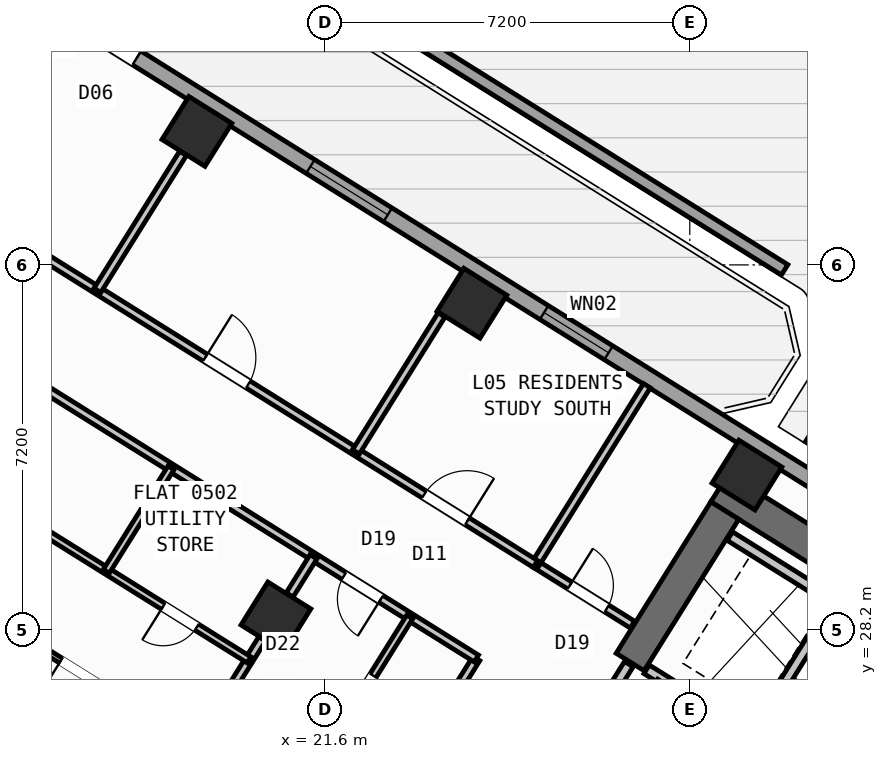
"""IFC4 building model, lengths in metres.
Left out: names, types, materials, properties, quantities, classifications, styles, units other than length and angle.
Written with IfcOpenShell. Run it as: python <this file> out.ifc"""

import sys

from ifc_helpers import new_model, si_unit, direction, frame, frame_2d, origin, origin_2d, place, context, subcontext, project, spatial, rectangle, hollow_rectangle, extrude, source, transform, mapped, element, fill, save


model = new_model("IFC4")
c1 = context("Model", 3, precision=1e-05, world=origin(), true_north=direction((0.0, 1.0)))
c2 = subcontext(c1, "Body", "Model", "MODEL_VIEW")
j1 = project(units=[si_unit("LENGTHUNIT", "METRE"), si_unit("PLANEANGLEUNIT", "RADIAN")], contexts=[c1])
p1 = place(None, origin())
s1 = spatial("IfcSite", under=j1, at=p1, CompositionType="ELEMENT")
p2 = place(p1, origin())
s2 = spatial("IfcBuilding", under=s1, at=p2, CompositionType="ELEMENT")
p3 = place(p2, frame((0.0, 0.0, 24.0)))
s3 = spatial("IfcBuildingStorey", under=s2, at=p3, CompositionType="ELEMENT", Elevation=24.0)
p4 = place(p3, frame((40.615, 23.983, 0.0), z_axis=(0.0, 0.0, 1.0), x_axis=(-0.848045953968, 0.529922692436, 0.0)))
e1 = element("IfcWall", 1, at=p4, inside=s3, PredefinedType="SHEAR", context=c2, shape_type="SweptSolid", body=[
    extrude(rectangle(XDim=13.24, YDim=0.65, at=frame_2d((6.62, 0.0))), origin(), (0.0, 0.0, 1.0), 3.35),
])
p5 = place(p3, frame((29.491, 30.552, 0.0), z_axis=(0.0, 0.0, 1.0), x_axis=(-0.529893103397, -0.8480644427, 0.0)))
e2 = element("IfcWall", 2, at=p5, inside=s3, PredefinedType="SHEAR", context=c2, shape_type="SweptSolid", body=[
    extrude(rectangle(XDim=3.525, YDim=0.65, at=frame_2d((1.763, 0.0))), origin(), (0.0, 0.0, 1.0), 3.35),
])
m1 = source(origin(), c2, "Body", "SweptSolid", [
    extrude(hollow_rectangle(XDim=1.0, YDim=1.0, WallThickness=0.04, at=origin_2d()), origin(), (0.0, 0.0, 1.0), 3.6),
])
for number, where, z_axis, x_axis in (
    (3, (29.928, 31.251, 0.0), (0.0, 0.0, 1.0), (-0.848, 0.53, 0.0)),
    (4, (24.5, 34.643, 0.0), (0.0, 0.0, 1.0), (-0.848, 0.53, 0.0)),
    (5, (20.632, 28.452, 0.0), (0.0, 0.0, 1.0), (-0.848, 0.53, 0.0)),
    (6, (19.073, 38.034, 0.0), (0.0, 0.0, 1.0), (-0.848, 0.53, 0.0)),
):
    element("IfcColumn", number, at=place(p3, frame(where, z_axis=z_axis, x_axis=x_axis)), inside=s3, PredefinedType="COLUMN", context=c2, shape_type="MappedRepresentation", body=[
        mapped(m1, transform((0.0, 0.0, 0.0), scale=1.0)),
    ])
p6 = place(p3, frame((40.961, 25.878, 0.0), z_axis=(0.0, 0.0, 1.0), x_axis=(-0.848053997745, 0.5299098196, 0.0)))
e7 = element("IfcWall", 7, at=p6, inside=s3, PredefinedType="PARAPET", context=c2, shape_type="SweptSolid", body=[
    extrude(rectangle(XDim=11.574, YDim=0.24, at=frame_2d((5.787, 0.0))), origin(), (0.0, 0.0, 1.0), 1.15),
])
p7 = place(p3, frame((30.672, 35.303, 0.0), z_axis=(0.0, 0.0, 1.0), x_axis=(-0.848051685884, 0.529913519425, 0.0)))
e8 = element("IfcWall", 8, at=p7, inside=s3, PredefinedType="PARAPET", context=c2, shape_type="SweptSolid", body=[
    extrude(rectangle(XDim=14.387, YDim=0.24, at=frame_2d((7.194, 0.0))), origin(), (0.0, 0.0, 1.0), 1.15),
])
p8 = place(p3, frame((14.138, 41.825, 0.0), z_axis=(0.0, 0.0, 1.0), x_axis=(0.848046498049, -0.529921821731, 0.0)))
e9 = element("IfcWall", 9, at=p8, inside=s3, PredefinedType="STANDARD", context=c2, shape_type="SweptSolid", body=[
    extrude(rectangle(XDim=31.588, YDim=0.32, at=frame_2d((15.794, 0.0))), origin(), (0.0, 0.0, 1.0), 3.35),
])
p9 = place(p8, frame((3.369, 0.0, 0.0)))
e10 = element("IfcOpeningElement", 10, at=p9, cuts=e9, PredefinedType="OPENING", context=c2, shape_type="SweptSolid", body=[
    extrude(rectangle(XDim=1.05, YDim=2.15, at=frame_2d((0.525, 1.075))), frame((0.0, 0.17, 0.0), z_axis=(0.0, -1.0, 0.0), x_axis=(1.0, 0.0, 0.0)), (0.0, 0.0, 1.0), 0.34),
])
p10 = place(p8, frame((0.946, 0.0, 0.85)))
e11 = element("IfcOpeningElement", 11, at=p10, cuts=e9, PredefinedType="OPENING", context=c2, shape_type="SweptSolid", body=[
    extrude(rectangle(XDim=1.8, YDim=1.5, at=frame_2d((0.9, 0.75))), frame((0.0, 0.17, 0.0), z_axis=(0.0, -1.0, 0.0), x_axis=(1.0, 0.0, 0.0)), (0.0, 0.0, 1.0), 0.34),
])
p11 = place(p8, frame((8.46, 0.0, 0.85)))
e12 = element("IfcOpeningElement", 12, at=p11, cuts=e9, PredefinedType="OPENING", context=c2, shape_type="SweptSolid", body=[
    extrude(rectangle(XDim=1.8, YDim=1.5, at=frame_2d((0.9, 0.75))), frame((0.0, 0.17, 0.0), z_axis=(0.0, -1.0, 0.0), x_axis=(1.0, 0.0, 0.0)), (0.0, 0.0, 1.0), 0.34),
])
p12 = place(p8, frame((13.899, 0.0, 0.85)))
e13 = element("IfcOpeningElement", 13, at=p12, cuts=e9, PredefinedType="OPENING", context=c2, shape_type="SweptSolid", body=[
    extrude(rectangle(XDim=1.5, YDim=1.5, at=frame_2d((0.75, 0.75))), frame((0.0, 0.17, 0.0), z_axis=(0.0, -1.0, 0.0), x_axis=(1.0, 0.0, 0.0)), (0.0, 0.0, 1.0), 0.34),
])
p13 = place(p8, frame((22.019, 0.0, 0.95)))
e14 = element("IfcOpeningElement", 14, at=p13, cuts=e9, PredefinedType="OPENING", context=c2, shape_type="SweptSolid", body=[
    extrude(rectangle(XDim=1.2, YDim=1.4, at=frame_2d((0.6, 0.7))), frame((0.0, 0.17, 0.0), z_axis=(0.0, -1.0, 0.0), x_axis=(1.0, 0.0, 0.0)), (0.0, 0.0, 1.0), 0.34),
])
p14 = place(p8, frame((27.569, 0.0, 0.95)))
e15 = element("IfcOpeningElement", 15, at=p14, cuts=e9, PredefinedType="OPENING", context=c2, shape_type="SweptSolid", body=[
    extrude(rectangle(XDim=1.2, YDim=1.4, at=frame_2d((0.6, 0.7))), frame((0.0, 0.17, 0.0), z_axis=(0.0, -1.0, 0.0), x_axis=(1.0, 0.0, 0.0)), (0.0, 0.0, 1.0), 0.34),
])
p15 = place(p3, frame((31.822, 24.998, 0.0), z_axis=(0.0, 0.0, 1.0), x_axis=(-0.848058348634, 0.529902856485, 0.0)))
e16 = element("IfcWall", 16, at=p15, inside=s3, PredefinedType="STANDARD", context=c2, shape_type="SweptSolid", body=[
    extrude(rectangle(XDim=4.568, YDim=0.2, at=frame_2d((2.284, 0.0))), origin(), (0.0, 0.0, 1.0), 3.34),
])
p16 = place(p3, frame((31.645, 28.716, 0.0), z_axis=(0.0, 0.0, 1.0), x_axis=(-0.52986693015, -0.848080795876, 0.0)))
e17 = element("IfcWall", 17, at=p16, inside=s3, PredefinedType="STANDARD", context=c2, shape_type="SweptSolid", body=[
    extrude(rectangle(XDim=2.66, YDim=0.2, at=frame_2d((1.33, 0.0))), origin(), (0.0, 0.0, 1.0), 3.34),
])
p17 = place(p3, frame((33.363, 27.69, 0.0), z_axis=(0.0, 0.0, 1.0), x_axis=(-0.848053806312, 0.529910125964, 0.0)))
e18 = element("IfcWall", 18, at=p17, inside=s3, PredefinedType="STANDARD", context=c2, shape_type="SweptSolid", body=[
    extrude(rectangle(XDim=4.448, YDim=0.2, at=frame_2d((2.224, 0.0))), origin(), (0.0, 0.0, 1.0), 3.34),
])
p18 = place(p3, frame((27.596, 27.52, 0.0), z_axis=(0.0, 0.0, 1.0), x_axis=(-0.529865479138, -0.848081702443, 0.0)))
e19 = element("IfcWall", 19, at=p18, inside=s3, PredefinedType="STANDARD", context=c2, shape_type="SweptSolid", body=[
    extrude(rectangle(XDim=2.96, YDim=0.2, at=frame_2d((1.48, 0.0))), origin(), (0.0, 0.0, 1.0), 3.34),
])
p19 = place(p18, frame((1.76, 0.0, 0.0)))
e20 = element("IfcOpeningElement", 20, at=p19, cuts=e19, PredefinedType="OPENING", context=c2, shape_type="SweptSolid", body=[
    extrude(rectangle(XDim=0.86, YDim=2.05, at=frame_2d((0.43, 1.025))), frame((0.0, 0.11, 0.0), z_axis=(0.0, -1.0, 0.0), x_axis=(1.0, 0.0, 0.0)), (0.0, 0.0, 1.0), 0.22),
])
p20 = place(p3, frame((27.669, 28.3, 0.0), z_axis=(0.0, 0.0, 1.0), x_axis=(-0.848040823168, 0.52993090327, 0.0)))
e21 = element("IfcWall", 21, at=p20, inside=s3, PredefinedType="PARTITIONING", context=c2, shape_type="SweptSolid", body=[
    extrude(rectangle(XDim=2.258, YDim=0.16, at=frame_2d((1.129, 0.0))), origin(), (0.0, 0.0, 1.0), 3.34),
])
p21 = place(p20, frame((0.598, 0.0, 0.0)))
e22 = element("IfcOpeningElement", 22, at=p21, cuts=e21, PredefinedType="OPENING", context=c2, shape_type="SweptSolid", body=[
    extrude(rectangle(XDim=0.86, YDim=2.05, at=frame_2d((0.43, 1.025))), frame((0.0, 0.09, 0.0), z_axis=(0.0, -1.0, 0.0), x_axis=(1.0, 0.0, 0.0)), (0.0, 0.0, 1.0), 0.18),
])
p22 = place(p3, frame((27.953, 33.016, 0.0), z_axis=(0.0, 0.0, 1.0), x_axis=(-0.529872022255, -0.848077614391, 0.0)))
e23 = element("IfcWall", 23, at=p22, inside=s3, PredefinedType="PARTITIONING", context=c2, shape_type="SweptSolid", body=[
    extrude(rectangle(XDim=4.15, YDim=0.16, at=frame_2d((2.075, 0.0))), origin(), (0.0, 0.0, 1.0), 3.34),
])
p23 = place(p3, frame((24.588, 27.631, 0.0), z_axis=(0.0, 0.0, 1.0), x_axis=(-0.529914586043, -0.848051019396, 0.0)))
e24 = element("IfcWall", 24, at=p23, inside=s3, PredefinedType="PARTITIONING", context=c2, shape_type="SweptSolid", body=[
    extrude(rectangle(XDim=15.35, YDim=0.16, at=frame_2d((7.675, 0.0))), origin(), (0.0, 0.0, 1.0), 3.34),
])
p24 = place(p3, frame((25.754, 29.497, 0.0), z_axis=(0.0, 0.0, 1.0), x_axis=(-0.848045850158, 0.529922858565, 0.0)))
e25 = element("IfcWall", 25, at=p24, inside=s3, PredefinedType="PARTITIONING", context=c2, shape_type="SweptSolid", body=[
    extrude(rectangle(XDim=16.73, YDim=0.16, at=frame_2d((8.365, 0.0))), origin(), (0.0, 0.0, 1.0), 3.34),
])
p25 = place(p24, frame((1.588, 0.0, 0.0)))
e26 = element("IfcOpeningElement", 26, at=p25, cuts=e25, PredefinedType="OPENING", context=c2, shape_type="SweptSolid", body=[
    extrude(rectangle(XDim=1.0, YDim=2.1, at=frame_2d((0.5, 1.05))), frame((0.0, 0.09, 0.0), z_axis=(0.0, -1.0, 0.0), x_axis=(1.0, 0.0, 0.0)), (0.0, 0.0, 1.0), 0.18),
])
p26 = place(p24, frame((6.685, 0.0, 0.0)))
e27 = element("IfcOpeningElement", 27, at=p26, cuts=e25, PredefinedType="OPENING", context=c2, shape_type="SweptSolid", body=[
    extrude(rectangle(XDim=1.0, YDim=2.1, at=frame_2d((0.5, 1.05))), frame((0.0, 0.09, 0.0), z_axis=(0.0, -1.0, 0.0), x_axis=(1.0, 0.0, 0.0)), (0.0, 0.0, 1.0), 0.18),
])
p27 = place(p24, frame((12.951, 0.0, 0.0)))
e28 = element("IfcOpeningElement", 28, at=p27, cuts=e25, PredefinedType="OPENING", context=c2, shape_type="SweptSolid", body=[
    extrude(rectangle(XDim=1.0, YDim=2.1, at=frame_2d((0.5, 1.05))), frame((0.0, 0.09, 0.0), z_axis=(0.0, -1.0, 0.0), x_axis=(1.0, 0.0, 0.0)), (0.0, 0.0, 1.0), 0.18),
])
p28 = place(p3, frame((24.588, 27.631, 0.0), z_axis=(0.0, 0.0, 1.0), x_axis=(-0.848041752158, 0.529929416617, 0.0)))
e29 = element("IfcWall", 29, at=p28, inside=s3, PredefinedType="PARTITIONING", context=c2, shape_type="SweptSolid", body=[
    extrude(rectangle(XDim=16.73, YDim=0.16, at=frame_2d((8.365, 0.0))), origin(), (0.0, 0.0, 1.0), 3.34),
])
p29 = place(p28, frame((2.22, 0.0, 0.0)))
e30 = element("IfcOpeningElement", 30, at=p29, cuts=e29, PredefinedType="OPENING", context=c2, shape_type="SweptSolid", body=[
    extrude(rectangle(XDim=0.86, YDim=2.05, at=frame_2d((0.43, 1.025))), frame((0.0, 0.09, 0.0), z_axis=(0.0, -1.0, 0.0), x_axis=(1.0, 0.0, 0.0)), (0.0, 0.0, 1.0), 0.18),
])
p30 = place(p28, frame((14.22, 0.0, 0.0)))
e31 = element("IfcOpeningElement", 31, at=p30, cuts=e29, PredefinedType="OPENING", context=c2, shape_type="SweptSolid", body=[
    extrude(rectangle(XDim=1.0, YDim=2.1, at=frame_2d((0.5, 1.05))), frame((0.0, 0.09, 0.0), z_axis=(0.0, -1.0, 0.0), x_axis=(1.0, 0.0, 0.0)), (0.0, 0.0, 1.0), 0.18),
])
p31 = place(p3, frame((21.374, 29.639, 0.0), z_axis=(0.0, 0.0, 1.0), x_axis=(-0.529974231203, -0.848013746505, 0.0)))
e32 = element("IfcWall", 32, at=p31, inside=s3, PredefinedType="PARTITIONING", context=c2, shape_type="SweptSolid", body=[
    extrude(rectangle(XDim=0.888, YDim=0.16, at=frame_2d((0.444, 0.0))), origin(), (0.0, 0.0, 1.0), 2.725),
])
p32 = place(p3, frame((20.361, 28.018, 0.0), z_axis=(0.0, 0.0, 1.0), x_axis=(-0.529915015264, -0.848050751193, 0.0)))
e33 = element("IfcWall", 33, at=p32, inside=s3, PredefinedType="PARTITIONING", context=c2, shape_type="SweptSolid", body=[
    extrude(rectangle(XDim=6.276, YDim=0.16, at=frame_2d((3.138, 0.0))), origin(), (0.0, 0.0, 1.0), 2.725),
])
p33 = place(p3, frame((23.273, 28.452, 0.0), z_axis=(0.0, 0.0, 1.0), x_axis=(-0.529867639402, -0.848080352747, 0.0)))
e34 = element("IfcWall", 34, at=p33, inside=s3, PredefinedType="PLUMBINGWALL", context=c2, shape_type="SweptSolid", body=[
    extrude(rectangle(XDim=3.51, YDim=0.14, at=frame_2d((1.755, 0.0))), origin(), (0.0, 0.0, 1.0), 2.995),
])
p34 = place(p33, frame((1.365, 0.0, 0.0)))
e35 = element("IfcOpeningElement", 35, at=p34, cuts=e34, PredefinedType="OPENING", context=c2, shape_type="SweptSolid", body=[
    extrude(rectangle(XDim=0.78, YDim=2.05, at=frame_2d((0.39, 1.025))), frame((0.0, 0.08, 0.0), z_axis=(0.0, -1.0, 0.0), x_axis=(1.0, 0.0, 0.0)), (0.0, 0.0, 1.0), 0.16),
])
p35 = place(p3, frame((20.102, 27.604, 0.0), z_axis=(0.0, 0.0, 1.0), x_axis=(-0.848044326704, 0.52992529657, 0.0)))
e36 = element("IfcWall", 36, at=p35, inside=s3, PredefinedType="PLUMBINGWALL", context=c2, shape_type="SweptSolid", body=[
    extrude(rectangle(XDim=8.94, YDim=0.14, at=frame_2d((4.47, 0.0))), origin(), (0.0, 0.0, 1.0), 3.34),
])
p36 = place(p35, frame((5.087, 0.0, 0.0)))
e37 = element("IfcOpeningElement", 37, at=p36, cuts=e36, PredefinedType="OPENING", context=c2, shape_type="SweptSolid", body=[
    extrude(rectangle(XDim=0.78, YDim=2.05, at=frame_2d((0.39, 1.025))), frame((0.0, 0.08, 0.0), z_axis=(0.0, -1.0, 0.0), x_axis=(1.0, 0.0, 0.0)), (0.0, 0.0, 1.0), 0.16),
])
p37 = place(p35, frame((1.218, 0.0, 0.0)))
e38 = element("IfcOpeningElement", 38, at=p37, cuts=e36, PredefinedType="OPENING", context=c2, shape_type="SweptSolid", body=[
    extrude(rectangle(XDim=0.78, YDim=2.05, at=frame_2d((0.39, 1.025))), frame((0.0, 0.08, 0.0), z_axis=(0.0, -1.0, 0.0), x_axis=(1.0, 0.0, 0.0)), (0.0, 0.0, 1.0), 0.16),
])
p38 = place(p3, frame((18.563, 31.396, 0.0), z_axis=(0.0, 0.0, 1.0), x_axis=(-0.530008045701, -0.847992612876, 0.0)))
e39 = element("IfcWall", 39, at=p38, inside=s3, PredefinedType="PLUMBINGWALL", context=c2, shape_type="SweptSolid", body=[
    extrude(rectangle(XDim=2.41, YDim=0.14, at=frame_2d((1.205, 0.0))), origin(), (0.0, 0.0, 1.0), 3.34),
])
p39 = place(p3, frame((19.053, 25.925, 0.0), z_axis=(0.0, 0.0, 1.0), x_axis=(-0.848051995289, 0.529913024266, 0.0)))
e40 = element("IfcWall", 40, at=p39, inside=s3, PredefinedType="PARTITIONING", context=c2, shape_type="SweptSolid", body=[
    extrude(rectangle(XDim=8.94, YDim=0.11, at=frame_2d((4.47, 0.0))), origin(), (0.0, 0.0, 1.0), 3.34),
])
p40 = place(p39, frame((0.434, 0.0, 0.0)))
e41 = element("IfcOpeningElement", 41, at=p40, cuts=e40, PredefinedType="OPENING", context=c2, shape_type="SweptSolid", body=[
    extrude(rectangle(XDim=0.92, YDim=2.08, at=frame_2d((0.46, 1.04))), frame((0.0, 0.065, 0.0), z_axis=(0.0, -1.0, 0.0), x_axis=(1.0, 0.0, 0.0)), (0.0, 0.0, 1.0), 0.13),
])
p41 = place(p39, frame((2.222, 0.0, 0.0)))
e42 = element("IfcOpeningElement", 42, at=p41, cuts=e40, PredefinedType="OPENING", context=c2, shape_type="SweptSolid", body=[
    extrude(rectangle(XDim=0.92, YDim=2.08, at=frame_2d((0.46, 1.04))), frame((0.0, 0.065, 0.0), z_axis=(0.0, -1.0, 0.0), x_axis=(1.0, 0.0, 0.0)), (0.0, 0.0, 1.0), 0.13),
])
p42 = place(p39, frame((4.01, 0.0, 0.0)))
e43 = element("IfcOpeningElement", 43, at=p42, cuts=e40, PredefinedType="OPENING", context=c2, shape_type="SweptSolid", body=[
    extrude(rectangle(XDim=0.92, YDim=2.08, at=frame_2d((0.46, 1.04))), frame((0.0, 0.065, 0.0), z_axis=(0.0, -1.0, 0.0), x_axis=(1.0, 0.0, 0.0)), (0.0, 0.0, 1.0), 0.13),
])
p43 = place(p39, frame((5.798, 0.0, 0.0)))
e44 = element("IfcOpeningElement", 44, at=p43, cuts=e40, PredefinedType="OPENING", context=c2, shape_type="SweptSolid", body=[
    extrude(rectangle(XDim=0.92, YDim=2.08, at=frame_2d((0.46, 1.04))), frame((0.0, 0.065, 0.0), z_axis=(0.0, -1.0, 0.0), x_axis=(1.0, 0.0, 0.0)), (0.0, 0.0, 1.0), 0.13),
])
p44 = place(p39, frame((7.586, 0.0, 0.0)))
e45 = element("IfcOpeningElement", 45, at=p44, cuts=e40, PredefinedType="OPENING", context=c2, shape_type="SweptSolid", body=[
    extrude(rectangle(XDim=0.92, YDim=2.08, at=frame_2d((0.46, 1.04))), frame((0.0, 0.065, 0.0), z_axis=(0.0, -1.0, 0.0), x_axis=(1.0, 0.0, 0.0)), (0.0, 0.0, 1.0), 0.13),
])
p45 = place(p3, frame((23.901, 34.414, 0.0), z_axis=(0.0, 0.0, 1.0), x_axis=(-0.529930102756, -0.848041323399, 0.0)))
e46 = element("IfcWall", 46, at=p45, inside=s3, PredefinedType="PARTITIONING", context=c2, shape_type="SweptSolid", body=[
    extrude(rectangle(XDim=3.188, YDim=0.16, at=frame_2d((1.594, 0.0))), origin(), (0.0, 0.0, 1.0), 3.34),
])
p46 = place(p3, frame((18.799, 37.602, 0.0), z_axis=(0.0, 0.0, 1.0), x_axis=(-0.529930102756, -0.848041323399, 0.0)))
e47 = element("IfcWall", 47, at=p46, inside=s3, PredefinedType="PARTITIONING", context=c2, shape_type="SweptSolid", body=[
    extrude(rectangle(XDim=3.188, YDim=0.16, at=frame_2d((1.594, 0.0))), origin(), (0.0, 0.0, 1.0), 2.725),
])
m2 = source(origin(), c2, "Body", "SweptSolid", [
    extrude(rectangle(XDim=1.05, YDim=2.15, at=frame_2d((0.525, 1.075))), frame((0.0, 0.025, 0.0), z_axis=(0.0, -1.0, 0.0), x_axis=(1.0, 0.0, 0.0)), (0.0, 0.0, 1.0), 0.05),
])
p47 = place(p9, origin())
e48 = element("IfcDoor", 48, at=p47, inside=s3, OperationType="SINGLE_SWING_RIGHT", PredefinedType="DOOR", context=c2, shape_type="MappedRepresentation", body=[
    mapped(m2, transform((0.0, 0.0, 0.0), scale=1.0)),
])
fill(e10, e48)
m3 = source(origin(), c2, "Body", "SweptSolid", [
    extrude(rectangle(XDim=1.8, YDim=1.5, at=frame_2d((0.9, 0.75))), frame((0.0, 0.03, 0.0), z_axis=(0.0, -1.0, 0.0), x_axis=(1.0, 0.0, 0.0)), (0.0, 0.0, 1.0), 0.06),
])
p48 = place(p11, origin())
e49 = element("IfcWindow", 49, at=p48, inside=s3, PartitioningType="SINGLE_PANEL", PredefinedType="WINDOW", context=c2, shape_type="MappedRepresentation", body=[
    mapped(m3, transform((0.0, 0.0, 0.0), scale=1.0)),
])
fill(e12, e49)
m4 = source(origin(), c2, "Body", "SweptSolid", [
    extrude(rectangle(XDim=1.5, YDim=1.5, at=frame_2d((0.75, 0.75))), frame((0.0, 0.03, 0.0), z_axis=(0.0, -1.0, 0.0), x_axis=(1.0, 0.0, 0.0)), (0.0, 0.0, 1.0), 0.06),
])
p49 = place(p12, origin())
e50 = element("IfcWindow", 50, at=p49, inside=s3, PartitioningType="SINGLE_PANEL", PredefinedType="WINDOW", context=c2, shape_type="MappedRepresentation", body=[
    mapped(m4, transform((0.0, 0.0, 0.0), scale=1.0)),
])
fill(e13, e50)
m5 = source(origin(), c2, "Body", "SweptSolid", [
    extrude(rectangle(XDim=0.86, YDim=2.05, at=frame_2d((0.43, 1.025))), frame((0.0, 0.025, 0.0), z_axis=(0.0, -1.0, 0.0), x_axis=(1.0, 0.0, 0.0)), (0.0, 0.0, 1.0), 0.05),
])
p50 = place(p21, frame((0.86, 0.0, 0.0), z_axis=(0.0, 0.0, 1.0), x_axis=(-1.0, 0.0, 0.0)))
e51 = element("IfcDoor", 51, at=p50, inside=s3, OperationType="SINGLE_SWING_LEFT", PredefinedType="DOOR", context=c2, shape_type="MappedRepresentation", body=[
    mapped(m5, transform((0.0, 0.0, 0.0), scale=1.0)),
])
fill(e22, e51)
p51 = place(p29, origin())
e52 = element("IfcDoor", 52, at=p51, inside=s3, OperationType="SINGLE_SWING_LEFT", PredefinedType="DOOR", context=c2, shape_type="MappedRepresentation", body=[
    mapped(m5, transform((0.0, 0.0, 0.0), scale=1.0)),
])
fill(e30, e52)
m6 = source(origin(), c2, "Body", "SweptSolid", [
    extrude(rectangle(XDim=0.78, YDim=2.05, at=frame_2d((0.39, 1.025))), frame((0.0, 0.025, 0.0), z_axis=(0.0, -1.0, 0.0), x_axis=(1.0, 0.0, 0.0)), (0.0, 0.0, 1.0), 0.05),
])
p52 = place(p34, origin())
e53 = element("IfcDoor", 53, at=p52, inside=s3, OperationType="SINGLE_SWING_RIGHT", PredefinedType="DOOR", context=c2, shape_type="MappedRepresentation", body=[
    mapped(m6, transform((0.0, 0.0, 0.0), scale=1.0)),
])
fill(e35, e53)
p53 = place(p37, origin())
e54 = element("IfcDoor", 54, at=p53, inside=s3, OperationType="SINGLE_SWING_RIGHT", PredefinedType="DOOR", context=c2, shape_type="MappedRepresentation", body=[
    mapped(m6, transform((0.0, 0.0, 0.0), scale=1.0)),
])
fill(e38, e54)
m7 = source(origin(), c2, "Body", "SweptSolid", [
    extrude(rectangle(XDim=0.92, YDim=2.08, at=frame_2d((0.46, 1.04))), frame((0.0, 0.025, 0.0), z_axis=(0.0, -1.0, 0.0), x_axis=(1.0, 0.0, 0.0)), (0.0, 0.0, 1.0), 0.05),
])
p54 = place(p41, origin())
e55 = element("IfcDoor", 55, at=p54, inside=s3, OperationType="SINGLE_SWING_RIGHT", PredefinedType="DOOR", context=c2, shape_type="MappedRepresentation", body=[
    mapped(m7, transform((0.0, 0.0, 0.0), scale=1.0)),
])
fill(e42, e55)
m8 = source(origin(), c2, "Body", "SweptSolid", [
    extrude(rectangle(XDim=1.0, YDim=2.1, at=frame_2d((0.5, 1.05))), frame((0.0, 0.025, 0.0), z_axis=(0.0, -1.0, 0.0), x_axis=(1.0, 0.0, 0.0)), (0.0, 0.0, 1.0), 0.05),
])
p55 = place(p25, frame((1.0, 0.0, 0.0), z_axis=(0.0, 0.0, 1.0), x_axis=(-1.0, 0.0, 0.0)))
e56 = element("IfcDoor", 56, at=p55, inside=s3, OperationType="SINGLE_SWING_RIGHT", PredefinedType="DOOR", context=c2, shape_type="MappedRepresentation", body=[
    mapped(m8, transform((0.0, 0.0, 0.0), scale=1.0)),
])
fill(e26, e56)
p56 = place(p26, frame((1.0, 0.0, 0.0), z_axis=(0.0, 0.0, 1.0), x_axis=(-1.0, 0.0, 0.0)))
e57 = element("IfcDoor", 57, at=p56, inside=s3, OperationType="SINGLE_SWING_LEFT", PredefinedType="DOOR", context=c2, shape_type="MappedRepresentation", body=[
    mapped(m8, transform((0.0, 0.0, 0.0), scale=1.0)),
])
fill(e27, e57)
save(model, sys.argv[1])
